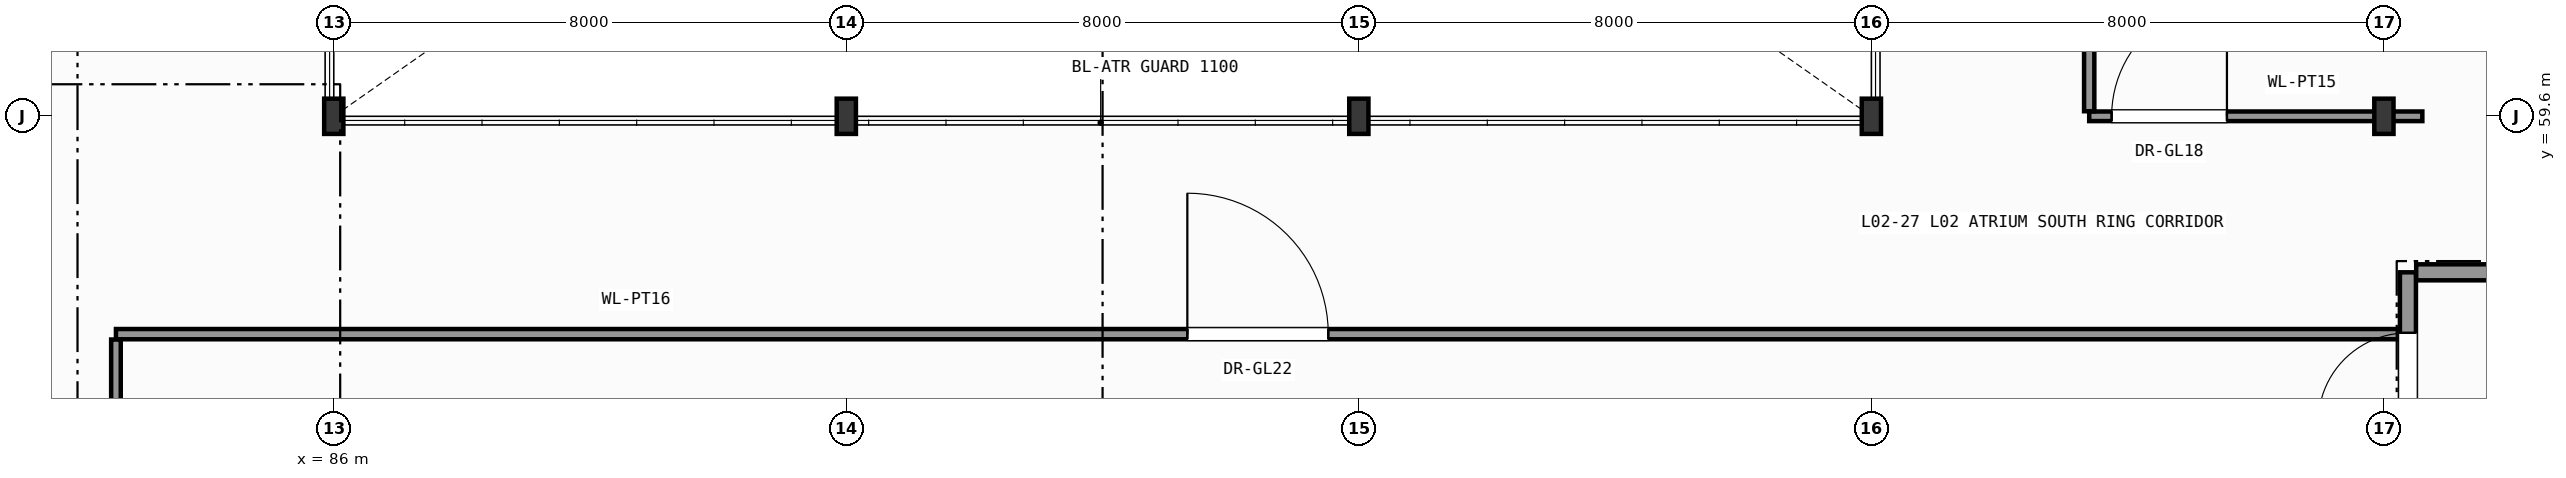
"""IFC4 building model, lengths in metres.
Left out: names, types, materials, properties, quantities, classifications, styles, units other than length and angle.
Written with IfcOpenShell. Run it as: python <this file> out.ifc"""

import sys

from ifc_helpers import new_model, si_unit, direction, frame, frame_2d, origin, origin_2d, place, context, subcontext, project, spatial, rectangle, i_section, extrude, element, fill, save


model = new_model("IFC4")
c1 = context("Model", 3, precision=1e-05, world=origin(), true_north=direction((0.0, 1.0)))
c2 = subcontext(c1, "Body", "Model", "MODEL_VIEW")
j1 = project(units=[si_unit("LENGTHUNIT", "METRE"), si_unit("PLANEANGLEUNIT", "RADIAN")], contexts=[c1])
p1 = place(None, origin())
s1 = spatial("IfcSite", under=j1, at=p1, CompositionType="ELEMENT")
p2 = place(p1, origin())
s2 = spatial("IfcBuilding", under=s1, at=p2, CompositionType="ELEMENT")
p3 = place(p2, frame((0.0, 0.0, 7.8)))
s3 = spatial("IfcBuildingStorey", under=s2, at=p3, CompositionType="ELEMENT", Elevation=7.8)
for number, where, z_axis, x_axis in (
    (1, (86.0, 59.6, 0.0), (0.0, 0.0, 1.0), (1.0, 0.0, 0.0)),
    (2, (94.0, 59.6, 0.0), (0.0, 0.0, 1.0), (1.0, 0.0, 0.0)),
    (3, (102.0, 59.6, 0.0), (0.0, 0.0, 1.0), (1.0, 0.0, 0.0)),
    (4, (110.0, 59.6, 0.0), (0.0, 0.0, 1.0), (1.0, 0.0, 0.0)),
    (5, (118.0, 59.6, 0.0), (0.0, 0.0, 1.0), (1.0, 0.0, 0.0)),
):
    element("IfcColumn", number, at=place(p3, frame(where, z_axis=z_axis, x_axis=x_axis)), inside=s3, PredefinedType="COLUMN", context=c2, shape_type="SweptSolid", body=[
        extrude(i_section(OverallWidth=0.3, OverallDepth=0.55, WebThickness=0.015, FlangeThickness=0.029, FilletRadius=0.027, at=origin_2d()), origin(), (0.0, 0.0, 1.0), 5.4),
    ])
p4 = place(p3, frame((118.375, 53.875, 0.0), z_axis=(0.0, 0.0, 1.0), x_axis=(0.0, 1.0, 0.0)))
e6 = element("IfcWall", 6, at=p4, inside=s3, PredefinedType="SHEAR", context=c2, shape_type="SweptSolid", body=[
    extrude(rectangle(XDim=3.29, YDim=0.25, at=frame_2d((1.645, 0.0))), origin(), (0.0, 0.0, 1.0), 5.15),
])
p5 = place(p4, frame((0.945, 0.0, 0.0)))
e7 = element("IfcOpeningElement", 7, at=p5, cuts=e6, PredefinedType="OPENING", context=c2, shape_type="SweptSolid", body=[
    extrude(rectangle(XDim=1.4, YDim=2.2, at=frame_2d((0.7, 1.1))), frame((0.0, 0.135, 0.0), z_axis=(0.0, -1.0, 0.0), x_axis=(1.0, 0.0, 0.0)), (0.0, 0.0, 1.0), 0.27),
])
p6 = place(p3, frame((118.504, 57.165, 0.0), z_axis=(0.0, 0.0, 1.0), x_axis=(1.0, 0.0, 0.0)))
e8 = element("IfcWall", 8, at=p6, inside=s3, PredefinedType="SHEAR", context=c2, shape_type="SweptSolid", body=[
    extrude(rectangle(XDim=6.892, YDim=0.25, at=frame_2d((3.446, 0.0))), origin(), (0.0, 0.0, 1.0), 5.15),
])
p7 = place(p3, frame((82.6, 56.2, 0.0), z_axis=(0.0, 0.0, 1.0), x_axis=(1.0, 0.0, 0.0)))
e9 = element("IfcWall", 9, at=p7, inside=s3, PredefinedType="PARTITIONING", context=c2, shape_type="SweptSolid", body=[
    extrude(rectangle(XDim=35.646, YDim=0.16, at=frame_2d((17.823, 0.0))), origin(), (0.0, 0.0, 1.0), 4.775),
])
p8 = place(p7, frame((16.723, 0.0, 0.0)))
e10 = element("IfcOpeningElement", 10, at=p8, cuts=e9, PredefinedType="OPENING", context=c2, shape_type="SweptSolid", body=[
    extrude(rectangle(XDim=2.2, YDim=2.6, at=frame_2d((1.1, 1.3))), frame((0.0, 0.09, 0.0), z_axis=(0.0, -1.0, 0.0), x_axis=(1.0, 0.0, 0.0)), (0.0, 0.0, 1.0), 0.18),
])
p9 = place(p3, frame((113.4, 59.6, 0.0), z_axis=(0.0, 0.0, 1.0), x_axis=(1.0, 0.0, 0.0)))
e11 = element("IfcWall", 11, at=p9, inside=s3, PredefinedType="PARTITIONING", context=c2, shape_type="SweptSolid", body=[
    extrude(rectangle(XDim=5.2, YDim=0.15, at=frame_2d((2.6, 0.0))), origin(), (0.0, 0.0, 1.0), 4.745),
])
p10 = place(p9, frame((0.35, 0.0, 0.0)))
e12 = element("IfcOpeningElement", 12, at=p10, cuts=e11, PredefinedType="OPENING", context=c2, shape_type="SweptSolid", body=[
    extrude(rectangle(XDim=1.8, YDim=2.4, at=frame_2d((0.9, 1.2))), frame((0.0, 0.085, 0.0), z_axis=(0.0, -1.0, 0.0), x_axis=(1.0, 0.0, 0.0)), (0.0, 0.0, 1.0), 0.17),
])
p11 = place(p3, frame((113.4, 59.679, 0.0), z_axis=(0.0, 0.0, 1.0), x_axis=(0.0, 1.0, 0.0)))
e13 = element("IfcWall", 13, at=p11, inside=s3, PredefinedType="PARTITIONING", context=c2, shape_type="SweptSolid", body=[
    extrude(rectangle(XDim=8.321, YDim=0.16, at=frame_2d((4.161, 0.0))), origin(), (0.0, 0.0, 1.0), 5.15),
])
p12 = place(p11, frame((3.061, 0.0, 0.0)))
e14 = element("IfcOpeningElement", 14, at=p12, cuts=e13, PredefinedType="OPENING", context=c2, shape_type="SweptSolid", body=[
    extrude(rectangle(XDim=2.2, YDim=2.6, at=frame_2d((1.1, 1.3))), frame((0.0, 0.09, 0.0), z_axis=(0.0, -1.0, 0.0), x_axis=(1.0, 0.0, 0.0)), (0.0, 0.0, 1.0), 0.18),
])
p13 = place(p3, frame((82.6, 52.6, 0.0), z_axis=(0.0, 0.0, 1.0), x_axis=(0.0, 1.0, 0.0)))
e15 = element("IfcWall", 15, at=p13, inside=s3, PredefinedType="PARTITIONING", context=c2, shape_type="SweptSolid", body=[
    extrude(rectangle(XDim=3.516, YDim=0.15, at=frame_2d((1.758, 0.0))), origin(), (0.0, 0.0, 1.0), 5.15),
])
p14 = place(p13, frame((1.258, 0.0, 0.0)))
e16 = element("IfcOpeningElement", 16, at=p14, cuts=e15, PredefinedType="OPENING", context=c2, shape_type="SweptSolid", body=[
    extrude(rectangle(XDim=1.0, YDim=2.15, at=frame_2d((0.5, 1.075))), frame((0.0, 0.085, 0.0), z_axis=(0.0, -1.0, 0.0), x_axis=(1.0, 0.0, 0.0)), (0.0, 0.0, 1.0), 0.17),
])
p15 = place(p5, origin())
e17 = element("IfcDoor", 17, at=p15, inside=s3, OperationType="SINGLE_SWING_LEFT", PredefinedType="DOOR", context=c2, shape_type="SweptSolid", body=[
    extrude(rectangle(XDim=1.4, YDim=2.2, at=frame_2d((0.7, 1.1))), frame((0.0, 0.025, 0.0), z_axis=(0.0, -1.0, 0.0), x_axis=(1.0, 0.0, 0.0)), (0.0, 0.0, 1.0), 0.05),
])
fill(e7, e17)
p16 = place(p8, origin())
e18 = element("IfcDoor", 18, at=p16, inside=s3, OperationType="SINGLE_SWING_LEFT", PredefinedType="DOOR", context=c2, shape_type="SweptSolid", body=[
    extrude(rectangle(XDim=2.2, YDim=2.6, at=frame_2d((1.1, 1.3))), frame((0.0, 0.025, 0.0), z_axis=(0.0, -1.0, 0.0), x_axis=(1.0, 0.0, 0.0)), (0.0, 0.0, 1.0), 0.05),
])
fill(e10, e18)
p17 = place(p10, origin())
e19 = element("IfcDoor", 19, at=p17, inside=s3, OperationType="SINGLE_SWING_RIGHT", PredefinedType="DOOR", context=c2, shape_type="SweptSolid", body=[
    extrude(rectangle(XDim=1.8, YDim=2.4, at=frame_2d((0.9, 1.2))), frame((0.0, 0.025, 0.0), z_axis=(0.0, -1.0, 0.0), x_axis=(1.0, 0.0, 0.0)), (0.0, 0.0, 1.0), 0.05),
])
fill(e12, e19)
save(model, sys.argv[1])
